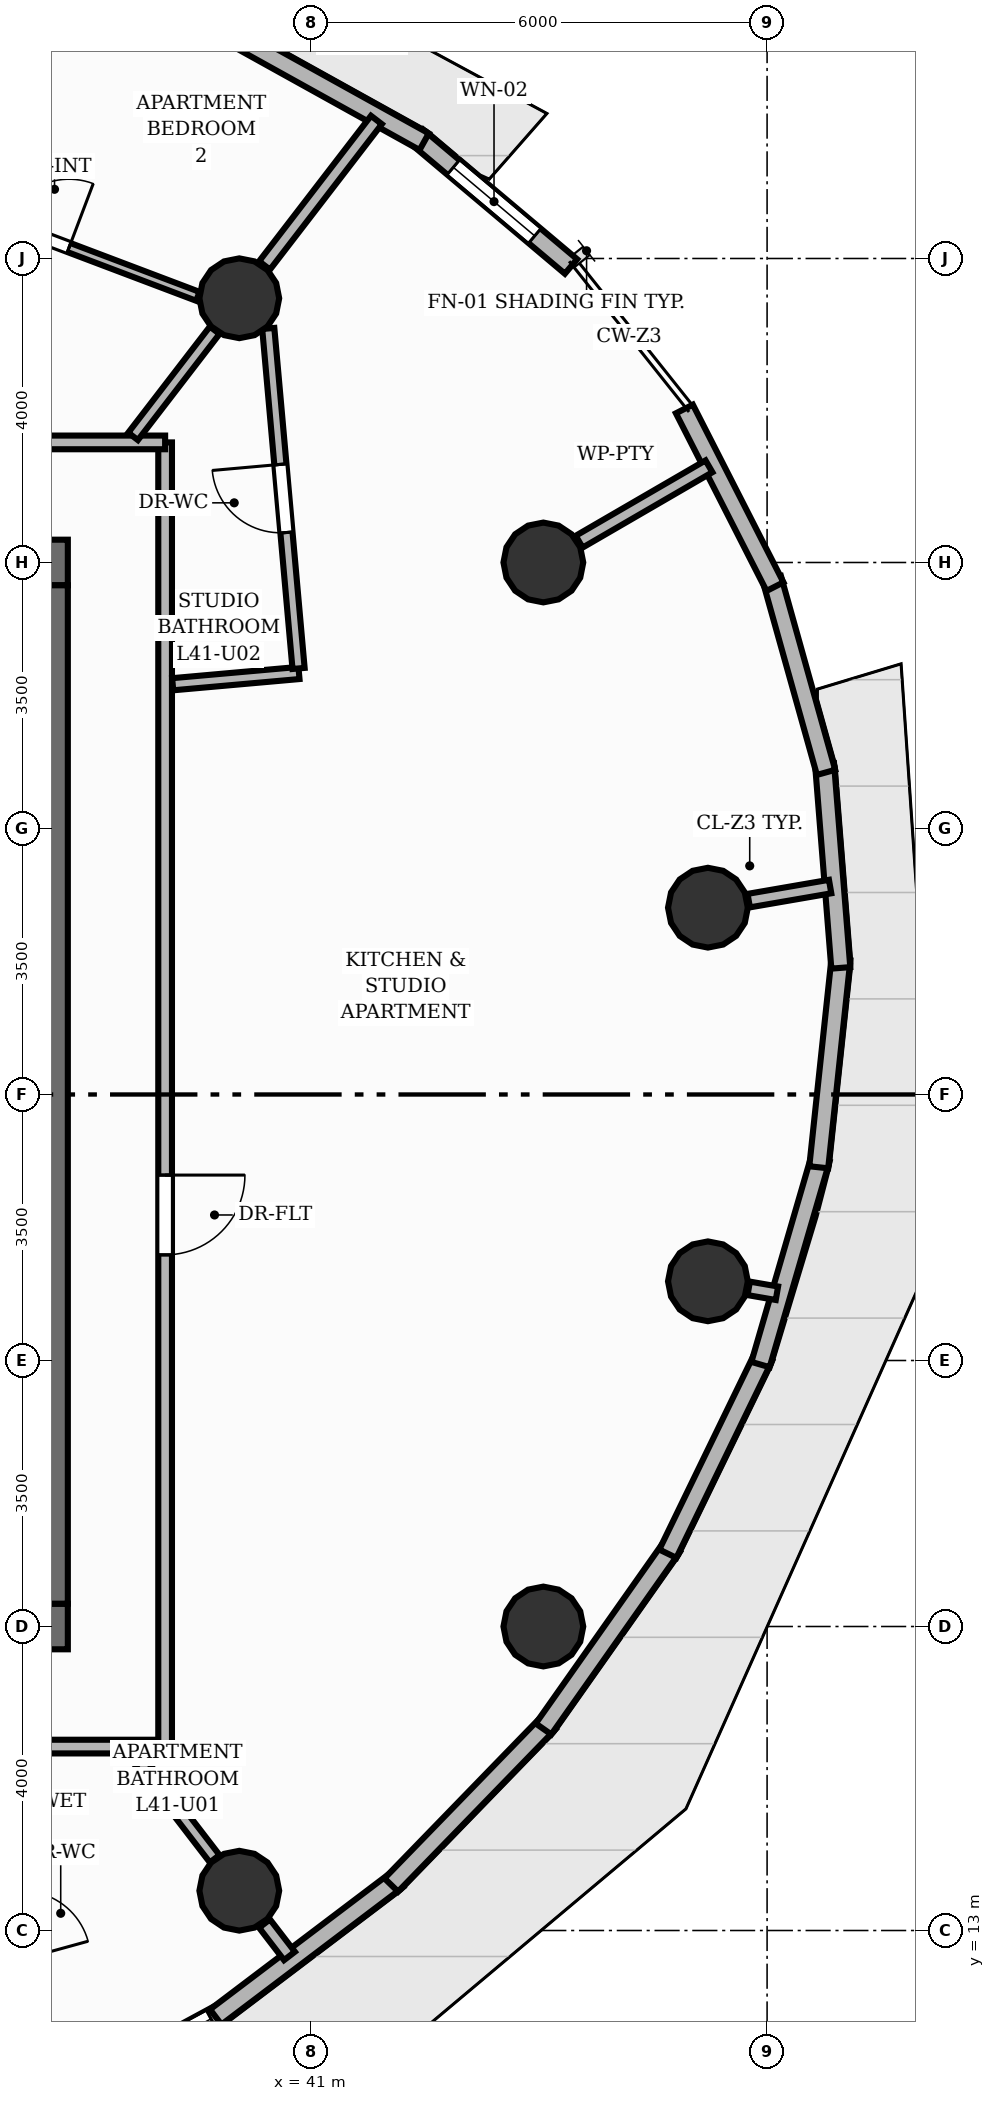
"""IFC4 building model, lengths in metres.
Left out: names, types, materials, properties, quantities, classifications, styles, units other than length and angle.
Written with IfcOpenShell. Run it as: python <this file> out.ifc"""

import sys

from ifc_helpers import new_model, si_unit, direction, frame, frame_2d, origin, origin_2d, place, context, subcontext, project, spatial, rectangle, circle, extrude, element, fill, save


model = new_model("IFC4")
c1 = context("Model", 3, precision=1e-05, world=origin(), true_north=direction((0.0, 1.0)))
c2 = subcontext(c1, "Body", "Model", "MODEL_VIEW")
j1 = project(units=[si_unit("LENGTHUNIT", "METRE"), si_unit("PLANEANGLEUNIT", "RADIAN")], contexts=[c1])
p1 = place(None, origin())
s1 = spatial("IfcSite", under=j1, at=p1, CompositionType="ELEMENT")
p2 = place(p1, origin())
s2 = spatial("IfcBuilding", under=s1, at=p2, CompositionType="ELEMENT")
p3 = place(p2, frame((0.0, 0.0, 139.36)))
s3 = spatial("IfcBuildingStorey", under=s2, at=p3, CompositionType="ELEMENT", Elevation=139.36)
p4 = place(p3, frame((22.7, 17.0, 0.0), z_axis=(0.0, 0.0, 1.0), x_axis=(1.0, 0.0, 0.0)))
e1 = element("IfcWall", 1, at=p4, inside=s3, PredefinedType="SHEAR", context=c2, shape_type="SweptSolid", body=[
    extrude(rectangle(XDim=15.1, YDim=0.6, at=frame_2d((7.55, 0.0))), origin(), (0.0, 0.0, 1.0), 3.2),
])
p5 = place(p4, frame((5.8, 0.0, 0.0)))
e2 = element("IfcOpeningElement", 2, at=p5, cuts=e1, PredefinedType="OPENING", context=c2, shape_type="SweptSolid", body=[
    extrude(rectangle(XDim=1.1, YDim=2.15, at=frame_2d((0.55, 1.075))), frame((0.0, 0.31, 0.0), z_axis=(0.0, -1.0, 0.0), x_axis=(1.0, 0.0, 0.0)), (0.0, 0.0, 1.0), 0.62),
])
p6 = place(p4, frame((9.35, 0.0, 0.0)))
e3 = element("IfcOpeningElement", 3, at=p6, cuts=e1, PredefinedType="OPENING", context=c2, shape_type="SweptSolid", body=[
    extrude(rectangle(XDim=0.9, YDim=2.1, at=frame_2d((0.45, 1.05))), frame((0.0, 0.31, 0.0), z_axis=(0.0, -1.0, 0.0), x_axis=(1.0, 0.0, 0.0)), (0.0, 0.0, 1.0), 0.62),
])
p7 = place(p3, frame((22.7, 31.0, 0.0), z_axis=(0.0, 0.0, 1.0), x_axis=(1.0, 0.0, 0.0)))
e4 = element("IfcWall", 4, at=p7, inside=s3, PredefinedType="SHEAR", context=c2, shape_type="SweptSolid", body=[
    extrude(rectangle(XDim=15.1, YDim=0.6, at=frame_2d((7.55, 0.0))), origin(), (0.0, 0.0, 1.0), 3.2),
])
p8 = place(p7, frame((11.7, 0.0, 0.0)))
e5 = element("IfcOpeningElement", 5, at=p8, cuts=e4, PredefinedType="OPENING", context=c2, shape_type="SweptSolid", body=[
    extrude(rectangle(XDim=1.1, YDim=2.15, at=frame_2d((0.55, 1.075))), frame((0.0, 0.31, 0.0), z_axis=(0.0, -1.0, 0.0), x_axis=(1.0, 0.0, 0.0)), (0.0, 0.0, 1.0), 0.62),
])
p9 = place(p3, frame((37.5, 17.3, 0.0), z_axis=(0.0, 0.0, 1.0), x_axis=(0.0, 1.0, 0.0)))
e6 = element("IfcWall", 6, at=p9, inside=s3, PredefinedType="SHEAR", context=c2, shape_type="SweptSolid", body=[
    extrude(rectangle(XDim=13.4, YDim=0.6, at=frame_2d((6.7, 0.0))), origin(), (0.0, 0.0, 1.0), 3.2),
])
for number, where, z_axis, x_axis in (
    (7, (46.221, 26.458, 0.0), (0.0, 0.0, 1.0), (1.0, 0.0, 0.0)),
    (8, (44.056, 31.0, 0.0), (0.0, 0.0, 1.0), (1.0, 0.0, 0.0)),
    (9, (40.056, 34.477, 0.0), (0.0, 0.0, 1.0), (1.0, 0.0, 0.0)),
    (10, (40.056, 13.523, 0.0), (0.0, 0.0, 1.0), (1.0, 0.0, 0.0)),
    (11, (44.056, 17.0, 0.0), (0.0, 0.0, 1.0), (1.0, 0.0, 0.0)),
    (12, (46.221, 21.542, 0.0), (0.0, 0.0, 1.0), (1.0, 0.0, 0.0)),
):
    element("IfcColumn", number, at=place(p3, frame(where, z_axis=z_axis, x_axis=x_axis)), inside=s3, PredefinedType="COLUMN", context=c2, shape_type="SweptSolid", body=[
        extrude(circle(Radius=0.525, at=origin_2d()), origin(), (0.0, 0.0, 1.0), 3.2),
    ])
p10 = place(p3, frame((42.395, 36.601, 0.0), z_axis=(0.0, 0.0, 1.0), x_axis=(0.764825125467, -0.644237943197, 0.0)))
e13 = element("IfcWall", 13, at=p10, inside=s3, PredefinedType="SOLIDWALL", context=c2, shape_type="SweptSolid", body=[
    extrude(rectangle(XDim=2.648, YDim=0.25, at=frame_2d((1.324, 0.0))), origin(), (0.0, 0.0, 1.0), 2.96),
])
p11 = place(p10, frame((0.624, 0.0, 0.85)))
e14 = element("IfcOpeningElement", 14, at=p11, cuts=e13, PredefinedType="OPENING", context=c2, shape_type="SweptSolid", body=[
    extrude(rectangle(XDim=1.4, YDim=1.55, at=frame_2d((0.7, 0.775))), frame((0.0, 0.135, 0.0), z_axis=(0.0, -1.0, 0.0), x_axis=(1.0, 0.0, 0.0)), (0.0, 0.0, 1.0), 0.27),
])
p12 = place(p3, frame((40.134, 37.844, 0.0), z_axis=(0.0, 0.0, 1.0), x_axis=(0.874341102682, -0.485311895755, 0.0)))
e15 = element("IfcWall", 15, at=p12, inside=s3, PredefinedType="SOLIDWALL", context=c2, shape_type="SweptSolid", body=[
    extrude(rectangle(XDim=2.693, YDim=0.25, at=frame_2d((1.346, 0.0))), origin(), (0.0, 0.0, 1.0), 2.96),
])
p13 = place(p3, frame((39.837, 11.921, 0.0), z_axis=(0.0, 0.0, 1.0), x_axis=(-0.879567466611, -0.475774181393, 0.0)))
e16 = element("IfcWall", 16, at=p13, inside=s3, PredefinedType="SOLIDWALL", context=c2, shape_type="SweptSolid", body=[
    extrude(rectangle(XDim=2.998, YDim=0.25, at=frame_2d((1.499, 0.0))), origin(), (0.0, 0.0, 1.0), 2.96),
])
p14 = place(p13, frame((0.175, 0.0, 0.85)))
e17 = element("IfcOpeningElement", 17, at=p14, cuts=e16, PredefinedType="OPENING", context=c2, shape_type="SweptSolid", body=[
    extrude(rectangle(XDim=1.65, YDim=1.55, at=frame_2d((0.825, 0.775))), frame((0.0, 0.135, 0.0), z_axis=(0.0, -1.0, 0.0), x_axis=(1.0, 0.0, 0.0)), (0.0, 0.0, 1.0), 0.27),
])
p15 = place(p3, frame((42.137, 13.671, 0.0), z_axis=(0.0, 0.0, 1.0), x_axis=(-0.797511213298, -0.603304122863, 0.0)))
e18 = element("IfcWall", 18, at=p15, inside=s3, PredefinedType="SOLIDWALL", context=c2, shape_type="SweptSolid", body=[
    extrude(rectangle(XDim=2.998, YDim=0.25, at=frame_2d((1.499, 0.0))), origin(), (0.0, 0.0, 1.0), 2.96),
])
p16 = place(p3, frame((44.128, 15.736, 0.0), z_axis=(0.0, 0.0, 1.0), x_axis=(-0.696240605886, -0.717808483312, 0.0)))
e19 = element("IfcWall", 19, at=p16, inside=s3, PredefinedType="SOLIDWALL", context=c2, shape_type="SweptSolid", body=[
    extrude(rectangle(XDim=2.977, YDim=0.25, at=frame_2d((1.489, 0.0))), origin(), (0.0, 0.0, 1.0), 2.96),
])
p17 = place(p3, frame((45.75, 18.052, 0.0), z_axis=(0.0, 0.0, 1.0), x_axis=(-0.576020449187, -0.817435283137, 0.0)))
e20 = element("IfcWall", 20, at=p17, inside=s3, PredefinedType="SOLIDWALL", context=c2, shape_type="SweptSolid", body=[
    extrude(rectangle(XDim=2.937, YDim=0.25, at=frame_2d((1.468, 0.0))), origin(), (0.0, 0.0, 1.0), 2.96),
])
p18 = place(p3, frame((46.953, 20.55, 0.0), z_axis=(0.0, 0.0, 1.0), x_axis=(-0.436882419805, -0.899518621967, 0.0)))
e21 = element("IfcWall", 21, at=p18, inside=s3, PredefinedType="SOLIDWALL", context=c2, shape_type="SweptSolid", body=[
    extrude(rectangle(XDim=2.882, YDim=0.25, at=frame_2d((1.441, 0.0))), origin(), (0.0, 0.0, 1.0), 2.96),
])
p19 = place(p3, frame((47.701, 23.152, 0.0), z_axis=(0.0, 0.0, 1.0), x_axis=(-0.27958078407, -0.960122172007, 0.0)))
e22 = element("IfcWall", 22, at=p19, inside=s3, PredefinedType="SOLIDWALL", context=c2, shape_type="SweptSolid", body=[
    extrude(rectangle(XDim=2.818, YDim=0.25, at=frame_2d((1.409, 0.0))), origin(), (0.0, 0.0, 1.0), 2.96),
])
p20 = place(p3, frame((47.971, 25.779, 0.0), z_axis=(0.0, 0.0, 1.0), x_axis=(-0.106010014212, -0.994365062181, 0.0)))
e23 = element("IfcWall", 23, at=p20, inside=s3, PredefinedType="SOLIDWALL", context=c2, shape_type="SweptSolid", body=[
    extrude(rectangle(XDim=2.752, YDim=0.25, at=frame_2d((1.376, 0.0))), origin(), (0.0, 0.0, 1.0), 2.96),
])
p21 = place(p3, frame((47.756, 28.35, 0.0), z_axis=(0.0, 0.0, 1.0), x_axis=(0.079420906371, -0.996841170714, 0.0)))
e24 = element("IfcWall", 24, at=p21, inside=s3, PredefinedType="SOLIDWALL", context=c2, shape_type="SweptSolid", body=[
    extrude(rectangle(XDim=2.693, YDim=0.25, at=frame_2d((1.346, 0.0))), origin(), (0.0, 0.0, 1.0), 2.96),
])
p22 = place(p3, frame((47.062, 30.789, 0.0), z_axis=(0.0, 0.0, 1.0), x_axis=(0.269469206067, -0.963009006698, 0.0)))
e25 = element("IfcWall", 25, at=p22, inside=s3, PredefinedType="SOLIDWALL", context=c2, shape_type="SweptSolid", body=[
    extrude(rectangle(XDim=2.648, YDim=0.25, at=frame_2d((1.324, 0.0))), origin(), (0.0, 0.0, 1.0), 2.96),
])
p23 = place(p3, frame((45.912, 33.02, 0.0), z_axis=(0.0, 0.0, 1.0), x_axis=(0.454196134835, -0.890901717981, 0.0)))
e26 = element("IfcWall", 26, at=p23, inside=s3, PredefinedType="SOLIDWALL", context=c2, shape_type="SweptSolid", body=[
    extrude(rectangle(XDim=2.624, YDim=0.25, at=frame_2d((1.312, 0.0))), origin(), (0.0, 0.0, 1.0), 2.96),
])
p24 = place(p3, frame((46.758, 26.551, 0.0), z_axis=(0.0, 0.0, 1.0), x_axis=(0.985361391556, 0.170478526599, 0.0)))
e27 = element("IfcWall", 27, at=p24, inside=s3, PredefinedType="PARTITIONING", context=c2, shape_type="SweptSolid", body=[
    extrude(rectangle(XDim=1.087, YDim=0.18, at=frame_2d((0.543, 0.0))), origin(), (0.0, 0.0, 1.0), 2.336),
])
p25 = place(p3, frame((44.528, 31.274, 0.0), z_axis=(0.0, 0.0, 1.0), x_axis=(0.864844369658, 0.502040054448, 0.0)))
e28 = element("IfcWall", 28, at=p25, inside=s3, PredefinedType="PARTITIONING", context=c2, shape_type="SweptSolid", body=[
    extrude(rectangle(XDim=1.974, YDim=0.18, at=frame_2d((0.987, 0.0))), origin(), (0.0, 0.0, 1.0), 2.336),
])
p26 = place(p3, frame((40.388, 34.908, 0.0), z_axis=(0.0, 0.0, 1.0), x_axis=(0.609549509747, 0.79274800231, 0.0)))
e29 = element("IfcWall", 29, at=p26, inside=s3, PredefinedType="PARTITIONING", context=c2, shape_type="SweptSolid", body=[
    extrude(rectangle(XDim=2.415, YDim=0.18, at=frame_2d((1.208, 0.0))), origin(), (0.0, 0.0, 1.0), 2.336),
])
p27 = place(p3, frame((40.388, 13.092, 0.0), z_axis=(0.0, 0.0, 1.0), x_axis=(0.609469486836, -0.792809526063, 0.0)))
e30 = element("IfcWall", 30, at=p27, inside=s3, PredefinedType="PARTITIONING", context=c2, shape_type="SweptSolid", body=[
    extrude(rectangle(XDim=0.538, YDim=0.18, at=frame_2d((0.269, 0.0))), origin(), (0.0, 0.0, 1.0), 2.336),
])
p28 = place(p3, frame((46.758, 21.449, 0.0), z_axis=(0.0, 0.0, 1.0), x_axis=(0.98535888436, -0.170493017491, 0.0)))
e31 = element("IfcWall", 31, at=p28, inside=s3, PredefinedType="PARTITIONING", context=c2, shape_type="SweptSolid", body=[
    extrude(rectangle(XDim=0.377, YDim=0.18, at=frame_2d((0.188, 0.0))), origin(), (0.0, 0.0, 1.0), 2.336),
])
p29 = place(p3, frame((39.08, 15.42, 0.0), z_axis=(0.0, 0.0, 1.0), x_axis=(-1.0, 0.0, 0.0)))
e32 = element("IfcWall", 32, at=p29, inside=s3, PredefinedType="PARTITIONING", context=c2, shape_type="SweptSolid", body=[
    extrude(rectangle(XDim=16.39, YDim=0.18, at=frame_2d((8.195, 0.0))), origin(), (0.0, 0.0, 1.0), 2.955),
])
p30 = place(p29, frame((4.593, 0.0, 0.0)))
e33 = element("IfcOpeningElement", 33, at=p30, cuts=e32, PredefinedType="OPENING", context=c2, shape_type="SweptSolid", body=[
    extrude(rectangle(XDim=1.05, YDim=2.15, at=frame_2d((0.525, 1.075))), frame((0.0, 0.1, 0.0), z_axis=(0.0, -1.0, 0.0), x_axis=(1.0, 0.0, 0.0)), (0.0, 0.0, 1.0), 0.2),
])
p31 = place(p3, frame((39.08, 32.58, 0.0), z_axis=(0.0, 0.0, 1.0), x_axis=(0.0, -1.0, 0.0)))
e34 = element("IfcWall", 34, at=p31, inside=s3, PredefinedType="PARTITIONING", context=c2, shape_type="SweptSolid", body=[
    extrude(rectangle(XDim=17.16, YDim=0.18, at=frame_2d((8.58, 0.0))), origin(), (0.0, 0.0, 1.0), 2.955),
])
p32 = place(p31, frame((9.64, 0.0, 0.0)))
e35 = element("IfcOpeningElement", 35, at=p32, cuts=e34, PredefinedType="OPENING", context=c2, shape_type="SweptSolid", body=[
    extrude(rectangle(XDim=1.05, YDim=2.15, at=frame_2d((0.525, 1.075))), frame((0.0, 0.1, 0.0), z_axis=(0.0, -1.0, 0.0), x_axis=(1.0, 0.0, 0.0)), (0.0, 0.0, 1.0), 0.2),
])
p33 = place(p3, frame((32.485, 32.58, 0.0), z_axis=(0.0, 0.0, 1.0), x_axis=(1.0, 0.0, 0.0)))
e36 = element("IfcWall", 36, at=p33, inside=s3, PredefinedType="PARTITIONING", context=c2, shape_type="SweptSolid", body=[
    extrude(rectangle(XDim=6.595, YDim=0.18, at=frame_2d((3.298, 0.0))), origin(), (0.0, 0.0, 1.0), 2.955),
])
p34 = place(p3, frame((36.455, 15.323, 0.0), z_axis=(0.0, 0.0, 1.0), x_axis=(0.265393905211, -0.964140070258, 0.0)))
e37 = element("IfcWall", 37, at=p34, inside=s3, PredefinedType="PLUMBINGWALL", context=c2, shape_type="SweptSolid", body=[
    extrude(rectangle(XDim=4.708, YDim=0.16, at=frame_2d((2.354, 0.0))), origin(), (0.0, 0.0, 1.0), 2.955),
])
p35 = place(p34, frame((1.904, 0.0, 0.0)))
e38 = element("IfcOpeningElement", 38, at=p35, cuts=e37, PredefinedType="OPENING", context=c2, shape_type="SweptSolid", body=[
    extrude(rectangle(XDim=0.9, YDim=2.1, at=frame_2d((0.45, 1.05))), frame((0.0, 0.09, 0.0), z_axis=(0.0, -1.0, 0.0), x_axis=(1.0, 0.0, 0.0)), (0.0, 0.0, 1.0), 0.18),
])
p36 = place(p3, frame((38.658, 15.341, 0.0), z_axis=(0.0, 0.0, 1.0), x_axis=(0.609536601946, -0.792757927042, 0.0)))
e39 = element("IfcWall", 39, at=p36, inside=s3, PredefinedType="PLUMBINGWALL", context=c2, shape_type="SweptSolid", body=[
    extrude(rectangle(XDim=1.761, YDim=0.16, at=frame_2d((0.881, 0.0))), origin(), (0.0, 0.0, 1.0), 2.336),
])
p37 = place(p3, frame((39.18, 29.398, 0.0), z_axis=(0.0, 0.0, 1.0), x_axis=(0.996058284503, 0.088701149215, 0.0)))
e40 = element("IfcWall", 40, at=p37, inside=s3, PredefinedType="PLUMBINGWALL", context=c2, shape_type="SweptSolid", body=[
    extrude(rectangle(XDim=1.668, YDim=0.16, at=frame_2d((0.834, 0.0))), origin(), (0.0, 0.0, 1.0), 2.955),
])
p38 = place(p3, frame((40.836, 29.606, 0.0), z_axis=(0.0, 0.0, 1.0), x_axis=(-0.08877110741, 0.996052052098, 0.0)))
e41 = element("IfcWall", 41, at=p38, inside=s3, PredefinedType="PLUMBINGWALL", context=c2, shape_type="SweptSolid", body=[
    extrude(rectangle(XDim=4.491, YDim=0.16, at=frame_2d((2.246, 0.0))), origin(), (0.0, 0.0, 1.0), 2.955),
])
p39 = place(p38, frame((1.796, 0.0, 0.0)))
e42 = element("IfcOpeningElement", 42, at=p39, cuts=e41, PredefinedType="OPENING", context=c2, shape_type="SweptSolid", body=[
    extrude(rectangle(XDim=0.9, YDim=2.1, at=frame_2d((0.45, 1.05))), frame((0.0, 0.09, 0.0), z_axis=(0.0, -1.0, 0.0), x_axis=(1.0, 0.0, 0.0)), (0.0, 0.0, 1.0), 0.18),
])
p40 = place(p3, frame((38.658, 32.659, 0.0), z_axis=(0.0, 0.0, 1.0), x_axis=(0.609536601946, 0.792757927042, 0.0)))
e43 = element("IfcWall", 43, at=p40, inside=s3, PredefinedType="PLUMBINGWALL", context=c2, shape_type="SweptSolid", body=[
    extrude(rectangle(XDim=1.761, YDim=0.16, at=frame_2d((0.881, 0.0))), origin(), (0.0, 0.0, 1.0), 2.336),
])
p41 = place(p3, frame((35.278, 36.103, 0.0), z_axis=(0.0, 0.0, 1.0), x_axis=(0.935309901838, -0.353829602385, 0.0)))
e44 = element("IfcWall", 44, at=p41, inside=s3, PredefinedType="PARTITIONING", context=c2, shape_type="SweptSolid", body=[
    extrude(rectangle(XDim=4.526, YDim=0.125, at=frame_2d((2.263, 0.0))), origin(), (0.0, 0.0, 1.0), 2.411),
])
p42 = place(p41, frame((1.813, 0.0, 0.0)))
e45 = element("IfcOpeningElement", 45, at=p42, cuts=e44, PredefinedType="OPENING", context=c2, shape_type="SweptSolid", body=[
    extrude(rectangle(XDim=0.9, YDim=2.1, at=frame_2d((0.45, 1.05))), frame((0.0, 0.073, 0.0), z_axis=(0.0, -1.0, 0.0), x_axis=(1.0, 0.0, 0.0)), (0.0, 0.0, 1.0), 0.145),
])
p43 = place(p11, origin())
e46 = element("IfcWindow", 46, at=p43, inside=s3, PartitioningType="SINGLE_PANEL", PredefinedType="WINDOW", context=c2, shape_type="SweptSolid", body=[
    extrude(rectangle(XDim=1.4, YDim=1.55, at=frame_2d((0.7, 0.775))), frame((0.0, 0.03, 0.0), z_axis=(0.0, -1.0, 0.0), x_axis=(1.0, 0.0, 0.0)), (0.0, 0.0, 1.0), 0.06),
])
fill(e14, e46)
p44 = place(p14, origin())
e47 = element("IfcWindow", 47, at=p44, inside=s3, PartitioningType="SINGLE_PANEL", PredefinedType="WINDOW", context=c2, shape_type="SweptSolid", body=[
    extrude(rectangle(XDim=1.65, YDim=1.55, at=frame_2d((0.825, 0.775))), frame((0.0, 0.03, 0.0), z_axis=(0.0, -1.0, 0.0), x_axis=(1.0, 0.0, 0.0)), (0.0, 0.0, 1.0), 0.06),
])
fill(e17, e47)
p45 = place(p32, origin())
e48 = element("IfcDoor", 48, at=p45, inside=s3, OperationType="SINGLE_SWING_LEFT", PredefinedType="DOOR", context=c2, shape_type="SweptSolid", body=[
    extrude(rectangle(XDim=1.05, YDim=2.15, at=frame_2d((0.525, 1.075))), frame((0.0, 0.025, 0.0), z_axis=(0.0, -1.0, 0.0), x_axis=(1.0, 0.0, 0.0)), (0.0, 0.0, 1.0), 0.05),
])
fill(e35, e48)
p46 = place(p39, origin())
e49 = element("IfcDoor", 49, at=p46, inside=s3, OperationType="SINGLE_SWING_RIGHT", PredefinedType="DOOR", context=c2, shape_type="SweptSolid", body=[
    extrude(rectangle(XDim=0.9, YDim=2.1, at=frame_2d((0.45, 1.05))), frame((0.0, 0.025, 0.0), z_axis=(0.0, -1.0, 0.0), x_axis=(1.0, 0.0, 0.0)), (0.0, 0.0, 1.0), 0.05),
])
fill(e42, e49)
p47 = place(p42, origin())
e50 = element("IfcDoor", 50, at=p47, inside=s3, OperationType="SINGLE_SWING_RIGHT", PredefinedType="DOOR", context=c2, shape_type="SweptSolid", body=[
    extrude(rectangle(XDim=0.9, YDim=2.1, at=frame_2d((0.45, 1.05))), frame((0.0, 0.025, 0.0), z_axis=(0.0, -1.0, 0.0), x_axis=(1.0, 0.0, 0.0)), (0.0, 0.0, 1.0), 0.05),
])
fill(e45, e50)
save(model, sys.argv[1])
